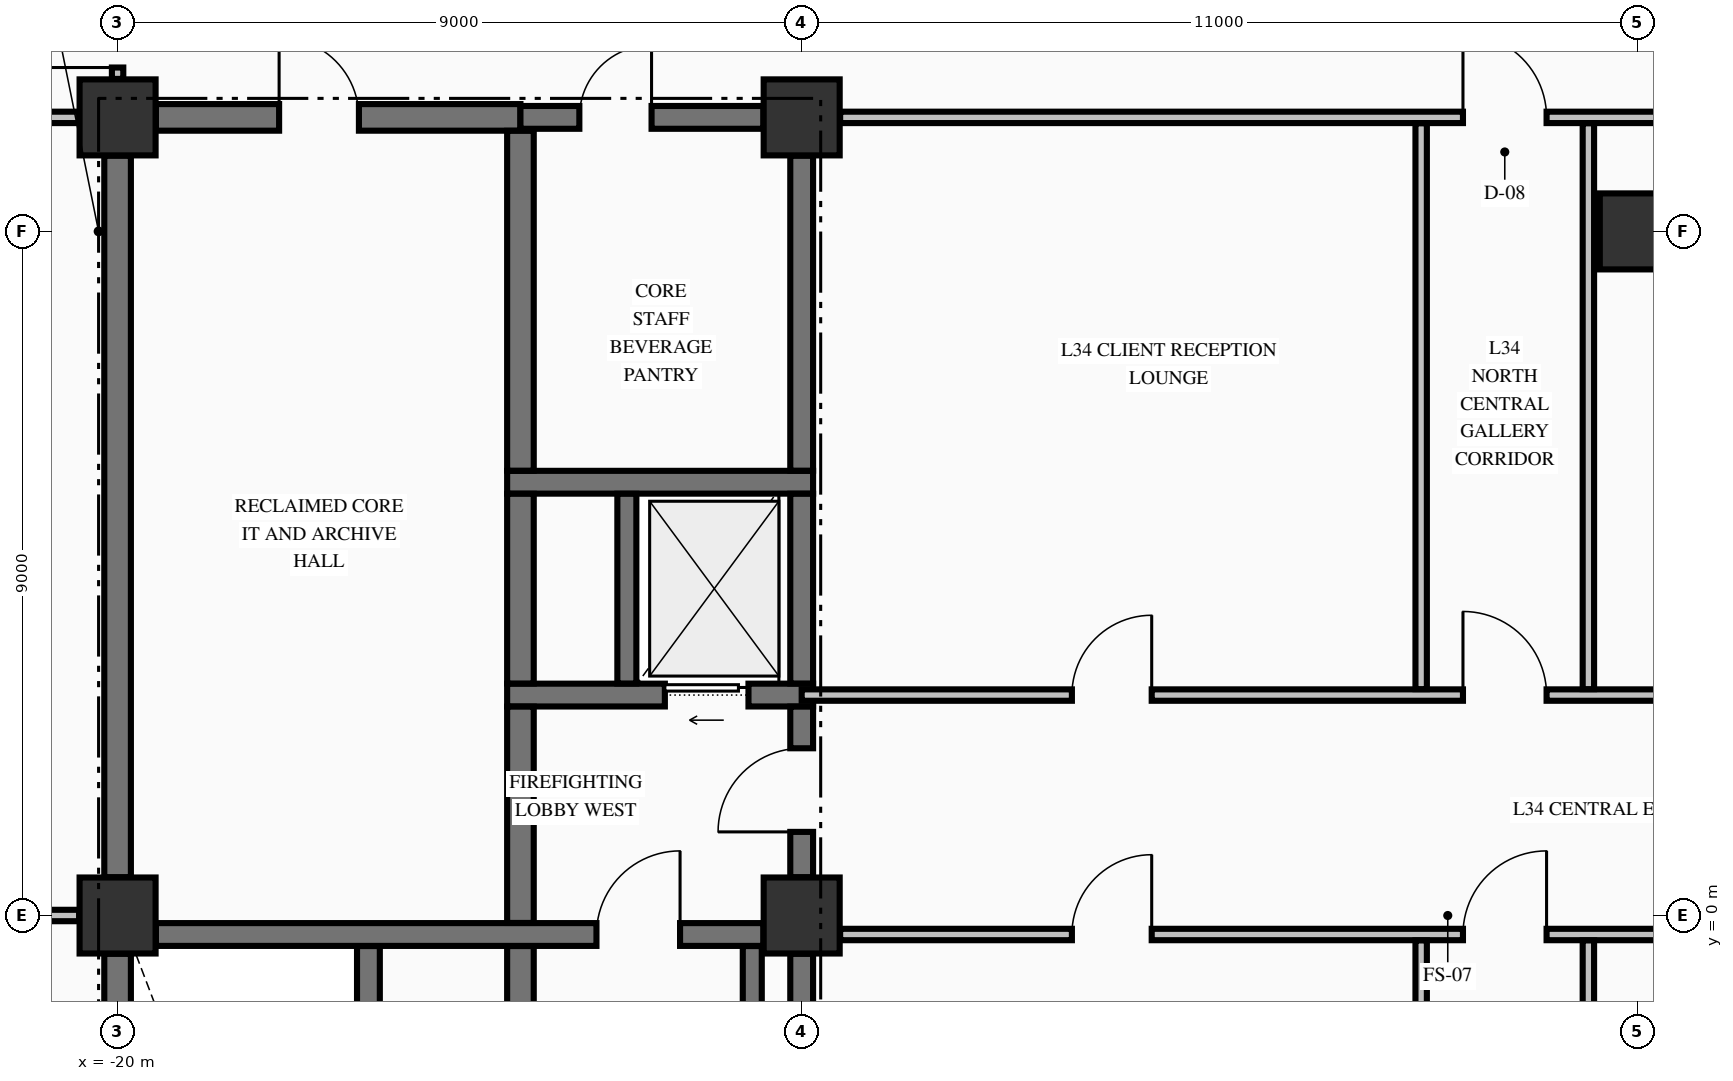
"""IFC4 building model, lengths in metres.
Left out: names, types, materials, properties, quantities, classifications, styles, units other than length and angle.
Written with IfcOpenShell. Run it as: python <this file> out.ifc"""

import sys

from ifc_helpers import new_model, si_unit, direction, frame, frame_2d, origin, origin_2d, place, context, subcontext, project, spatial, rectangle, extrude, element, fill, save


model = new_model("IFC4")
c1 = context("Model", 3, precision=1e-05, world=origin(), true_north=direction((0.0, 1.0)))
c2 = subcontext(c1, "Body", "Model", "MODEL_VIEW")
j1 = project(units=[si_unit("LENGTHUNIT", "METRE"), si_unit("PLANEANGLEUNIT", "RADIAN")], contexts=[c1])
p1 = place(None, origin())
s1 = spatial("IfcSite", under=j1, at=p1, CompositionType="ELEMENT")
p2 = place(p1, origin())
s2 = spatial("IfcBuilding", under=s1, at=p2, CompositionType="ELEMENT")
p3 = place(p2, frame((0.0, 0.0, 135.63)))
s3 = spatial("IfcBuildingStorey", under=s2, at=p3, CompositionType="ELEMENT", Elevation=135.63)
for number, where, z_axis, x_axis in (
    (1, (-20.0, 10.5, -0.25), (0.0, 0.0, 1.0), (1.0, 0.0, 0.0)),
    (2, (-11.0, 0.0, -0.25), (0.0, 0.0, 1.0), (1.0, 0.0, 0.0)),
    (3, (-11.0, 10.5, -0.25), (0.0, 0.0, 1.0), (1.0, 0.0, 0.0)),
    (4, (0.0, 9.0, -0.25), (0.0, 0.0, 1.0), (1.0, 0.0, 0.0)),
    (5, (-20.0, 0.0, -0.25), (0.0, 0.0, 1.0), (1.0, 0.0, 0.0)),
):
    element("IfcColumn", number, at=place(p3, frame(where, z_axis=z_axis, x_axis=x_axis)), inside=s3, PredefinedType="COLUMN", context=c2, shape_type="SweptSolid", body=[
        extrude(rectangle(XDim=1.0, YDim=1.0, at=origin_2d()), origin(), (0.0, 0.0, 1.0), 3.57),
    ])
p4 = place(p3, frame((-19.496, -0.25, 0.0), z_axis=(0.0, 0.0, 1.0), x_axis=(1.0, 0.0, 0.0)))
e6 = element("IfcWall", 6, at=p4, inside=s3, PredefinedType="SHEAR", context=c2, shape_type="SweptSolid", body=[
    extrude(rectangle(XDim=7.992, YDim=0.3, at=frame_2d((3.996, 0.0))), origin(), (0.0, 0.0, 1.0), 3.32),
])
p5 = place(p4, frame((5.796, 0.0, 0.0)))
e7 = element("IfcOpeningElement", 7, at=p5, cuts=e6, PredefinedType="OPENING", context=c2, shape_type="SweptSolid", body=[
    extrude(rectangle(XDim=1.1, YDim=2.15, at=frame_2d((0.55, 1.075))), frame((0.0, 0.16, 0.0), z_axis=(0.0, -1.0, 0.0), x_axis=(1.0, 0.0, 0.0)), (0.0, 0.0, 1.0), 0.32),
])
p6 = place(p3, frame((-14.875, 2.9, 0.0), z_axis=(0.0, 0.0, 1.0), x_axis=(1.0, 0.0, 0.0)))
e8 = element("IfcWall", 8, at=p6, inside=s3, PredefinedType="SHEAR", context=c2, shape_type="SweptSolid", body=[
    extrude(rectangle(XDim=4.025, YDim=0.3, at=frame_2d((2.012, 0.0))), origin(), (0.0, 0.0, 1.0), 3.32),
])
p7 = place(p6, frame((2.075, 0.0, 0.0)))
e9 = element("IfcOpeningElement", 9, at=p7, cuts=e8, PredefinedType="OPENING", context=c2, shape_type="SweptSolid", body=[
    extrude(rectangle(XDim=1.1, YDim=2.2, at=frame_2d((0.55, 1.1))), frame((0.0, 0.16, 0.0), z_axis=(0.0, -1.0, 0.0), x_axis=(1.0, 0.0, 0.0)), (0.0, 0.0, 1.0), 0.32),
])
p8 = place(p3, frame((-14.875, 5.7, 0.0), z_axis=(0.0, 0.0, 1.0), x_axis=(1.0, 0.0, 0.0)))
e10 = element("IfcWall", 10, at=p8, inside=s3, PredefinedType="SHEAR", context=c2, shape_type="SweptSolid", body=[
    extrude(rectangle(XDim=4.025, YDim=0.3, at=frame_2d((2.012, 0.0))), origin(), (0.0, 0.0, 1.0), 3.32),
])
p9 = place(p3, frame((-19.496, 10.5, 0.0), z_axis=(0.0, 0.0, 1.0), x_axis=(1.0, 0.0, 0.0)))
e11 = element("IfcWall", 11, at=p9, inside=s3, PredefinedType="SHEAR", context=c2, shape_type="SweptSolid", body=[
    extrude(rectangle(XDim=4.796, YDim=0.35, at=frame_2d((2.398, 0.0))), origin(), (0.0, 0.0, 1.0), 3.32),
])
p10 = place(p9, frame((1.621, 0.0, 0.0)))
e12 = element("IfcOpeningElement", 12, at=p10, cuts=e11, PredefinedType="OPENING", context=c2, shape_type="SweptSolid", body=[
    extrude(rectangle(XDim=1.05, YDim=2.15, at=frame_2d((0.525, 1.075))), frame((0.0, 0.185, 0.0), z_axis=(0.0, -1.0, 0.0), x_axis=(1.0, 0.0, 0.0)), (0.0, 0.0, 1.0), 0.37),
])
p11 = place(p3, frame((-14.7, 10.5, 0.0), z_axis=(0.0, 0.0, 1.0), x_axis=(1.0, 0.0, 0.0)))
e13 = element("IfcWall", 13, at=p11, inside=s3, PredefinedType="SHEAR", context=c2, shape_type="SweptSolid", body=[
    extrude(rectangle(XDim=3.196, YDim=0.3, at=frame_2d((1.598, 0.0))), origin(), (0.0, 0.0, 1.0), 3.32),
])
p12 = place(p11, frame((0.775, 0.0, 0.0)))
e14 = element("IfcOpeningElement", 14, at=p12, cuts=e13, PredefinedType="OPENING", context=c2, shape_type="SweptSolid", body=[
    extrude(rectangle(XDim=0.95, YDim=2.15, at=frame_2d((0.475, 1.075))), frame((0.0, 0.16, 0.0), z_axis=(0.0, -1.0, 0.0), x_axis=(1.0, 0.0, 0.0)), (0.0, 0.0, 1.0), 0.32),
])
p13 = place(p3, frame((-10.494, -0.25, 0.0), z_axis=(0.0, 0.0, 1.0), x_axis=(1.0, 0.0, 0.0)))
e15 = element("IfcWall", 15, at=p13, inside=s3, PredefinedType="PARTITIONING", context=c2, shape_type="SweptSolid", body=[
    extrude(rectangle(XDim=20.988, YDim=0.15, at=frame_2d((10.494, 0.0))), origin(), (0.0, 0.0, 1.0), 3.32),
])
p14 = place(p13, frame((8.194, 0.0, 0.0)))
e16 = element("IfcOpeningElement", 16, at=p14, cuts=e15, PredefinedType="OPENING", context=c2, shape_type="SweptSolid", body=[
    extrude(rectangle(XDim=1.1, YDim=2.15, at=frame_2d((0.55, 1.075))), frame((0.0, 0.085, 0.0), z_axis=(0.0, -1.0, 0.0), x_axis=(1.0, 0.0, 0.0)), (0.0, 0.0, 1.0), 0.17),
])
p15 = place(p13, frame((3.049, 0.0, 0.0)))
e17 = element("IfcOpeningElement", 17, at=p15, cuts=e15, PredefinedType="OPENING", context=c2, shape_type="SweptSolid", body=[
    extrude(rectangle(XDim=1.05, YDim=2.15, at=frame_2d((0.525, 1.075))), frame((0.0, 0.085, 0.0), z_axis=(0.0, -1.0, 0.0), x_axis=(1.0, 0.0, 0.0)), (0.0, 0.0, 1.0), 0.17),
])
p16 = place(p13, frame((15.189, 0.0, 0.0)))
e18 = element("IfcOpeningElement", 18, at=p16, cuts=e15, PredefinedType="OPENING", context=c2, shape_type="SweptSolid", body=[
    extrude(rectangle(XDim=0.95, YDim=2.15, at=frame_2d((0.475, 1.075))), frame((0.0, 0.085, 0.0), z_axis=(0.0, -1.0, 0.0), x_axis=(1.0, 0.0, 0.0)), (0.0, 0.0, 1.0), 0.17),
])
p17 = place(p3, frame((-27.394, 0.0, 0.0), z_axis=(0.0, 0.0, 1.0), x_axis=(1.0, 0.0, 0.0)))
e19 = element("IfcWall", 19, at=p17, inside=s3, PredefinedType="PARTITIONING", context=c2, shape_type="SweptSolid", body=[
    extrude(rectangle(XDim=6.888, YDim=0.15, at=frame_2d((3.444, 0.0))), origin(), (0.0, 0.0, 1.0), 2.81),
])
p18 = place(p3, frame((-11.0, 2.9, 0.0), z_axis=(0.0, 0.0, 1.0), x_axis=(1.0, 0.0, 0.0)))
e20 = element("IfcWall", 20, at=p18, inside=s3, PredefinedType="PARTITIONING", context=c2, shape_type="SweptSolid", body=[
    extrude(rectangle(XDim=22.0, YDim=0.15, at=frame_2d((11.0, 0.0))), origin(), (0.0, 0.0, 1.0), 3.32),
])
p19 = place(p18, frame((8.7, 0.0, 0.0)))
e21 = element("IfcOpeningElement", 21, at=p19, cuts=e20, PredefinedType="OPENING", context=c2, shape_type="SweptSolid", body=[
    extrude(rectangle(XDim=1.1, YDim=2.15, at=frame_2d((0.55, 1.075))), frame((0.0, 0.085, 0.0), z_axis=(0.0, -1.0, 0.0), x_axis=(1.0, 0.0, 0.0)), (0.0, 0.0, 1.0), 0.17),
])
p20 = place(p18, frame((3.555, 0.0, 0.0)))
e22 = element("IfcOpeningElement", 22, at=p20, cuts=e20, PredefinedType="OPENING", context=c2, shape_type="SweptSolid", body=[
    extrude(rectangle(XDim=1.05, YDim=2.15, at=frame_2d((0.525, 1.075))), frame((0.0, 0.085, 0.0), z_axis=(0.0, -1.0, 0.0), x_axis=(1.0, 0.0, 0.0)), (0.0, 0.0, 1.0), 0.17),
])
p21 = place(p18, frame((15.62, 0.0, 0.0)))
e23 = element("IfcOpeningElement", 23, at=p21, cuts=e20, PredefinedType="OPENING", context=c2, shape_type="SweptSolid", body=[
    extrude(rectangle(XDim=1.1, YDim=2.15, at=frame_2d((0.55, 1.075))), frame((0.0, 0.085, 0.0), z_axis=(0.0, -1.0, 0.0), x_axis=(1.0, 0.0, 0.0)), (0.0, 0.0, 1.0), 0.17),
])
p22 = place(p3, frame((-27.835, 10.5, 0.0), z_axis=(0.0, 0.0, 1.0), x_axis=(1.0, 0.0, 0.0)))
e24 = element("IfcWall", 24, at=p22, inside=s3, PredefinedType="PARTITIONING", context=c2, shape_type="SweptSolid", body=[
    extrude(rectangle(XDim=7.329, YDim=0.15, at=frame_2d((3.665, 0.0))), origin(), (0.0, 0.0, 1.0), 3.32),
])
p23 = place(p22, frame((3.36, 0.0, 0.0)))
e25 = element("IfcOpeningElement", 25, at=p23, cuts=e24, PredefinedType="OPENING", context=c2, shape_type="SweptSolid", body=[
    extrude(rectangle(XDim=0.95, YDim=2.15, at=frame_2d((0.475, 1.075))), frame((0.0, 0.085, 0.0), z_axis=(0.0, -1.0, 0.0), x_axis=(1.0, 0.0, 0.0)), (0.0, 0.0, 1.0), 0.17),
])
p24 = place(p3, frame((-10.494, 10.5, 0.0), z_axis=(0.0, 0.0, 1.0), x_axis=(1.0, 0.0, 0.0)))
e26 = element("IfcWall", 26, at=p24, inside=s3, PredefinedType="PARTITIONING", context=c2, shape_type="SweptSolid", body=[
    extrude(rectangle(XDim=20.988, YDim=0.15, at=frame_2d((10.494, 0.0))), origin(), (0.0, 0.0, 1.0), 3.32),
])
p25 = place(p24, frame((8.194, 0.0, 0.0)))
e27 = element("IfcOpeningElement", 27, at=p25, cuts=e26, PredefinedType="OPENING", context=c2, shape_type="SweptSolid", body=[
    extrude(rectangle(XDim=1.1, YDim=2.15, at=frame_2d((0.55, 1.075))), frame((0.0, 0.085, 0.0), z_axis=(0.0, -1.0, 0.0), x_axis=(1.0, 0.0, 0.0)), (0.0, 0.0, 1.0), 0.17),
])
p26 = place(p3, frame((-20.0, -9.446, 0.0), z_axis=(0.0, 0.0, 1.0), x_axis=(0.0, 1.0, 0.0)))
e28 = element("IfcWall", 28, at=p26, inside=s3, PredefinedType="SHEAR", context=c2, shape_type="SweptSolid", body=[
    extrude(rectangle(XDim=8.942, YDim=0.35, at=frame_2d((4.471, 0.0))), origin(), (0.0, 0.0, 1.0), 3.32),
])
p27 = place(p3, frame((-20.0, 0.504, 0.0), z_axis=(0.0, 0.0, 1.0), x_axis=(0.0, 1.0, 0.0)))
e29 = element("IfcWall", 29, at=p27, inside=s3, PredefinedType="SHEAR", context=c2, shape_type="SweptSolid", body=[
    extrude(rectangle(XDim=9.492, YDim=0.35, at=frame_2d((4.746, 0.0))), origin(), (0.0, 0.0, 1.0), 3.32),
])
p28 = place(p3, frame((-16.7, -9.773, 0.0), z_axis=(0.0, 0.0, 1.0), x_axis=(0.0, 1.0, 0.0)))
e30 = element("IfcWall", 30, at=p28, inside=s3, PredefinedType="SHEAR", context=c2, shape_type="SweptSolid", body=[
    extrude(rectangle(XDim=9.371, YDim=0.3, at=frame_2d((4.686, 0.0))), origin(), (0.0, 0.0, 1.0), 3.32),
])
p29 = place(p3, frame((-14.7, -9.773, 0.0), z_axis=(0.0, 0.0, 1.0), x_axis=(0.0, 1.0, 0.0)))
e31 = element("IfcWall", 31, at=p29, inside=s3, PredefinedType="SHEAR", context=c2, shape_type="SweptSolid", body=[
    extrude(rectangle(XDim=9.371, YDim=0.35, at=frame_2d((4.686, 0.0))), origin(), (0.0, 0.0, 1.0), 3.32),
])
p30 = place(p3, frame((-14.7, -0.098, 0.0), z_axis=(0.0, 0.0, 1.0), x_axis=(0.0, 1.0, 0.0)))
e32 = element("IfcWall", 32, at=p30, inside=s3, PredefinedType="SHEAR", context=c2, shape_type="SweptSolid", body=[
    extrude(rectangle(XDim=2.846, YDim=0.35, at=frame_2d((1.423, 0.0))), origin(), (0.0, 0.0, 1.0), 3.32),
])
p31 = place(p3, frame((-14.7, 3.052, 0.0), z_axis=(0.0, 0.0, 1.0), x_axis=(0.0, 1.0, 0.0)))
e33 = element("IfcWall", 33, at=p31, inside=s3, PredefinedType="SHEAR", context=c2, shape_type="SweptSolid", body=[
    extrude(rectangle(XDim=2.496, YDim=0.35, at=frame_2d((1.248, 0.0))), origin(), (0.0, 0.0, 1.0), 3.32),
])
p32 = place(p3, frame((-14.7, 5.852, 0.0), z_axis=(0.0, 0.0, 1.0), x_axis=(0.0, 1.0, 0.0)))
e34 = element("IfcWall", 34, at=p32, inside=s3, PredefinedType="SHEAR", context=c2, shape_type="SweptSolid", body=[
    extrude(rectangle(XDim=4.471, YDim=0.35, at=frame_2d((2.235, 0.0))), origin(), (0.0, 0.0, 1.0), 3.32),
])
p33 = place(p3, frame((-13.3, 3.052, 0.0), z_axis=(0.0, 0.0, 1.0), x_axis=(0.0, 1.0, 0.0)))
e35 = element("IfcWall", 35, at=p33, inside=s3, PredefinedType="SOLIDWALL", context=c2, shape_type="SweptSolid", body=[
    extrude(rectangle(XDim=2.496, YDim=0.25, at=frame_2d((1.248, 0.0))), origin(), (0.0, 0.0, 1.0), 3.32),
])
p34 = place(p3, frame((-11.65, -9.798, 0.0), z_axis=(0.0, 0.0, 1.0), x_axis=(0.0, 1.0, 0.0)))
e36 = element("IfcWall", 36, at=p34, inside=s3, PredefinedType="SOLIDWALL", context=c2, shape_type="SweptSolid", body=[
    extrude(rectangle(XDim=9.396, YDim=0.25, at=frame_2d((4.698, 0.0))), origin(), (0.0, 0.0, 1.0), 3.32),
])
p35 = place(p3, frame((-11.0, -9.446, 0.0), z_axis=(0.0, 0.0, 1.0), x_axis=(0.0, 1.0, 0.0)))
e37 = element("IfcWall", 37, at=p35, inside=s3, PredefinedType="SHEAR", context=c2, shape_type="SweptSolid", body=[
    extrude(rectangle(XDim=8.942, YDim=0.3, at=frame_2d((4.471, 0.0))), origin(), (0.0, 0.0, 1.0), 3.32),
])
p36 = place(p3, frame((-11.0, 0.504, 0.0), z_axis=(0.0, 0.0, 1.0), x_axis=(0.0, 1.0, 0.0)))
e38 = element("IfcWall", 38, at=p36, inside=s3, PredefinedType="SHEAR", context=c2, shape_type="SweptSolid", body=[
    extrude(rectangle(XDim=2.244, YDim=0.3, at=frame_2d((1.122, 0.0))), origin(), (0.0, 0.0, 1.0), 3.32),
])
p37 = place(p36, frame((0.596, 0.0, 0.0)))
e39 = element("IfcOpeningElement", 39, at=p37, cuts=e38, PredefinedType="OPENING", context=c2, shape_type="SweptSolid", body=[
    extrude(rectangle(XDim=1.1, YDim=2.15, at=frame_2d((0.55, 1.075))), frame((0.0, 0.16, 0.0), z_axis=(0.0, -1.0, 0.0), x_axis=(1.0, 0.0, 0.0)), (0.0, 0.0, 1.0), 0.32),
])
p38 = place(p3, frame((-11.0, 3.052, 0.0), z_axis=(0.0, 0.0, 1.0), x_axis=(0.0, 1.0, 0.0)))
e40 = element("IfcWall", 40, at=p38, inside=s3, PredefinedType="SHEAR", context=c2, shape_type="SweptSolid", body=[
    extrude(rectangle(XDim=2.496, YDim=0.3, at=frame_2d((1.248, 0.0))), origin(), (0.0, 0.0, 1.0), 3.32),
])
p39 = place(p3, frame((-11.0, 5.852, 0.0), z_axis=(0.0, 0.0, 1.0), x_axis=(0.0, 1.0, 0.0)))
e41 = element("IfcWall", 41, at=p39, inside=s3, PredefinedType="SHEAR", context=c2, shape_type="SweptSolid", body=[
    extrude(rectangle(XDim=4.144, YDim=0.3, at=frame_2d((2.072, 0.0))), origin(), (0.0, 0.0, 1.0), 3.32),
])
p40 = place(p3, frame((-20.0, 11.006, 0.0), z_axis=(0.0, 0.0, 1.0), x_axis=(0.0, 1.0, 0.0)))
e42 = element("IfcWall", 42, at=p40, inside=s3, PredefinedType="PARTITIONING", context=c2, shape_type="SweptSolid", body=[
    extrude(rectangle(XDim=1.466, YDim=0.15, at=frame_2d((0.733, 0.0))), origin(), (0.0, 0.0, 1.0), 2.81),
])
p41 = place(p40, frame((0.15, 0.0, 0.0)))
e43 = element("IfcOpeningElement", 43, at=p41, cuts=e42, PredefinedType="OPENING", context=c2, shape_type="SweptSolid", body=[
    extrude(rectangle(XDim=0.95, YDim=2.15, at=frame_2d((0.475, 1.075))), frame((0.0, 0.085, 0.0), z_axis=(0.0, -1.0, 0.0), x_axis=(1.0, 0.0, 0.0)), (0.0, 0.0, 1.0), 0.17),
])
p42 = place(p3, frame((-2.85, -9.872, 0.0), z_axis=(0.0, 0.0, 1.0), x_axis=(0.0, 1.0, 0.0)))
e44 = element("IfcWall", 44, at=p42, inside=s3, PredefinedType="PARTITIONING", context=c2, shape_type="SweptSolid", body=[
    extrude(rectangle(XDim=9.544, YDim=0.15, at=frame_2d((4.772, 0.0))), origin(), (0.0, 0.0, 1.0), 3.32),
])
p43 = place(p3, frame((-2.85, 2.978, 0.0), z_axis=(0.0, 0.0, 1.0), x_axis=(0.0, 1.0, 0.0)))
e45 = element("IfcWall", 45, at=p43, inside=s3, PredefinedType="PARTITIONING", context=c2, shape_type="SweptSolid", body=[
    extrude(rectangle(XDim=7.444, YDim=0.15, at=frame_2d((3.722, 0.0))), origin(), (0.0, 0.0, 1.0), 3.32),
])
p44 = place(p3, frame((-0.65, -5.247, 0.0), z_axis=(0.0, 0.0, 1.0), x_axis=(0.0, 1.0, 0.0)))
e46 = element("IfcWall", 46, at=p44, inside=s3, PredefinedType="PARTITIONING", context=c2, shape_type="SweptSolid", body=[
    extrude(rectangle(XDim=4.919, YDim=0.15, at=frame_2d((2.459, 0.0))), origin(), (0.0, 0.0, 1.0), 3.32),
])
p45 = place(p3, frame((-0.65, 2.978, 0.0), z_axis=(0.0, 0.0, 1.0), x_axis=(0.0, 1.0, 0.0)))
e47 = element("IfcWall", 47, at=p45, inside=s3, PredefinedType="PARTITIONING", context=c2, shape_type="SweptSolid", body=[
    extrude(rectangle(XDim=7.444, YDim=0.15, at=frame_2d((3.722, 0.0))), origin(), (0.0, 0.0, 1.0), 3.32),
])
p46 = place(p5, origin())
e48 = element("IfcDoor", 48, at=p46, inside=s3, OperationType="SINGLE_SWING_RIGHT", PredefinedType="DOOR", context=c2, shape_type="SweptSolid", body=[
    extrude(rectangle(XDim=1.1, YDim=2.15, at=frame_2d((0.55, 1.075))), frame((0.0, 0.025, 0.0), z_axis=(0.0, -1.0, 0.0), x_axis=(1.0, 0.0, 0.0)), (0.0, 0.0, 1.0), 0.05),
])
fill(e7, e48)
p47 = place(p37, origin())
e49 = element("IfcDoor", 49, at=p47, inside=s3, OperationType="SINGLE_SWING_LEFT", PredefinedType="DOOR", context=c2, shape_type="SweptSolid", body=[
    extrude(rectangle(XDim=1.1, YDim=2.15, at=frame_2d((0.55, 1.075))), frame((0.0, 0.025, 0.0), z_axis=(0.0, -1.0, 0.0), x_axis=(1.0, 0.0, 0.0)), (0.0, 0.0, 1.0), 0.05),
])
fill(e39, e49)
p48 = place(p7, origin())
e50 = element("IfcDoor", 50, at=p48, inside=s3, OperationType="SLIDING_TO_LEFT", PredefinedType="DOOR", context=c2, shape_type="SweptSolid", body=[
    extrude(rectangle(XDim=1.1, YDim=2.2, at=frame_2d((0.55, 1.1))), frame((0.0, 0.025, 0.0), z_axis=(0.0, -1.0, 0.0), x_axis=(1.0, 0.0, 0.0)), (0.0, 0.0, 1.0), 0.05),
])
fill(e9, e50)
p49 = place(p12, origin())
e51 = element("IfcDoor", 51, at=p49, inside=s3, OperationType="SINGLE_SWING_RIGHT", PredefinedType="DOOR", context=c2, shape_type="SweptSolid", body=[
    extrude(rectangle(XDim=0.95, YDim=2.15, at=frame_2d((0.475, 1.075))), frame((0.0, 0.025, 0.0), z_axis=(0.0, -1.0, 0.0), x_axis=(1.0, 0.0, 0.0)), (0.0, 0.0, 1.0), 0.05),
])
fill(e14, e51)
p50 = place(p10, origin())
e52 = element("IfcDoor", 52, at=p50, inside=s3, OperationType="SINGLE_SWING_LEFT", PredefinedType="DOOR", context=c2, shape_type="SweptSolid", body=[
    extrude(rectangle(XDim=1.05, YDim=2.15, at=frame_2d((0.525, 1.075))), frame((0.0, 0.025, 0.0), z_axis=(0.0, -1.0, 0.0), x_axis=(1.0, 0.0, 0.0)), (0.0, 0.0, 1.0), 0.05),
])
fill(e12, e52)
p51 = place(p25, origin())
e53 = element("IfcDoor", 53, at=p51, inside=s3, OperationType="SINGLE_SWING_LEFT", PredefinedType="DOOR", context=c2, shape_type="SweptSolid", body=[
    extrude(rectangle(XDim=1.1, YDim=2.15, at=frame_2d((0.55, 1.075))), frame((0.0, 0.025, 0.0), z_axis=(0.0, -1.0, 0.0), x_axis=(1.0, 0.0, 0.0)), (0.0, 0.0, 1.0), 0.05),
])
fill(e27, e53)
p52 = place(p19, origin())
e54 = element("IfcDoor", 54, at=p52, inside=s3, OperationType="SINGLE_SWING_LEFT", PredefinedType="DOOR", context=c2, shape_type="SweptSolid", body=[
    extrude(rectangle(XDim=1.1, YDim=2.15, at=frame_2d((0.55, 1.075))), frame((0.0, 0.025, 0.0), z_axis=(0.0, -1.0, 0.0), x_axis=(1.0, 0.0, 0.0)), (0.0, 0.0, 1.0), 0.05),
])
fill(e21, e54)
p53 = place(p14, origin())
e55 = element("IfcDoor", 55, at=p53, inside=s3, OperationType="SINGLE_SWING_RIGHT", PredefinedType="DOOR", context=c2, shape_type="SweptSolid", body=[
    extrude(rectangle(XDim=1.1, YDim=2.15, at=frame_2d((0.55, 1.075))), frame((0.0, 0.025, 0.0), z_axis=(0.0, -1.0, 0.0), x_axis=(1.0, 0.0, 0.0)), (0.0, 0.0, 1.0), 0.05),
])
fill(e16, e55)
p54 = place(p20, origin())
e56 = element("IfcDoor", 56, at=p54, inside=s3, OperationType="SINGLE_SWING_RIGHT", PredefinedType="DOOR", context=c2, shape_type="SweptSolid", body=[
    extrude(rectangle(XDim=1.05, YDim=2.15, at=frame_2d((0.525, 1.075))), frame((0.0, 0.025, 0.0), z_axis=(0.0, -1.0, 0.0), x_axis=(1.0, 0.0, 0.0)), (0.0, 0.0, 1.0), 0.05),
])
fill(e22, e56)
p55 = place(p15, origin())
e57 = element("IfcDoor", 57, at=p55, inside=s3, OperationType="SINGLE_SWING_RIGHT", PredefinedType="DOOR", context=c2, shape_type="SweptSolid", body=[
    extrude(rectangle(XDim=1.05, YDim=2.15, at=frame_2d((0.525, 1.075))), frame((0.0, 0.025, 0.0), z_axis=(0.0, -1.0, 0.0), x_axis=(1.0, 0.0, 0.0)), (0.0, 0.0, 1.0), 0.05),
])
fill(e17, e57)
p56 = place(p41, origin())
e58 = element("IfcDoor", 58, at=p56, inside=s3, OperationType="SINGLE_SWING_LEFT", PredefinedType="DOOR", context=c2, shape_type="SweptSolid", body=[
    extrude(rectangle(XDim=0.95, YDim=2.15, at=frame_2d((0.475, 1.075))), frame((0.0, 0.025, 0.0), z_axis=(0.0, -1.0, 0.0), x_axis=(1.0, 0.0, 0.0)), (0.0, 0.0, 1.0), 0.05),
])
fill(e43, e58)
save(model, sys.argv[1])
